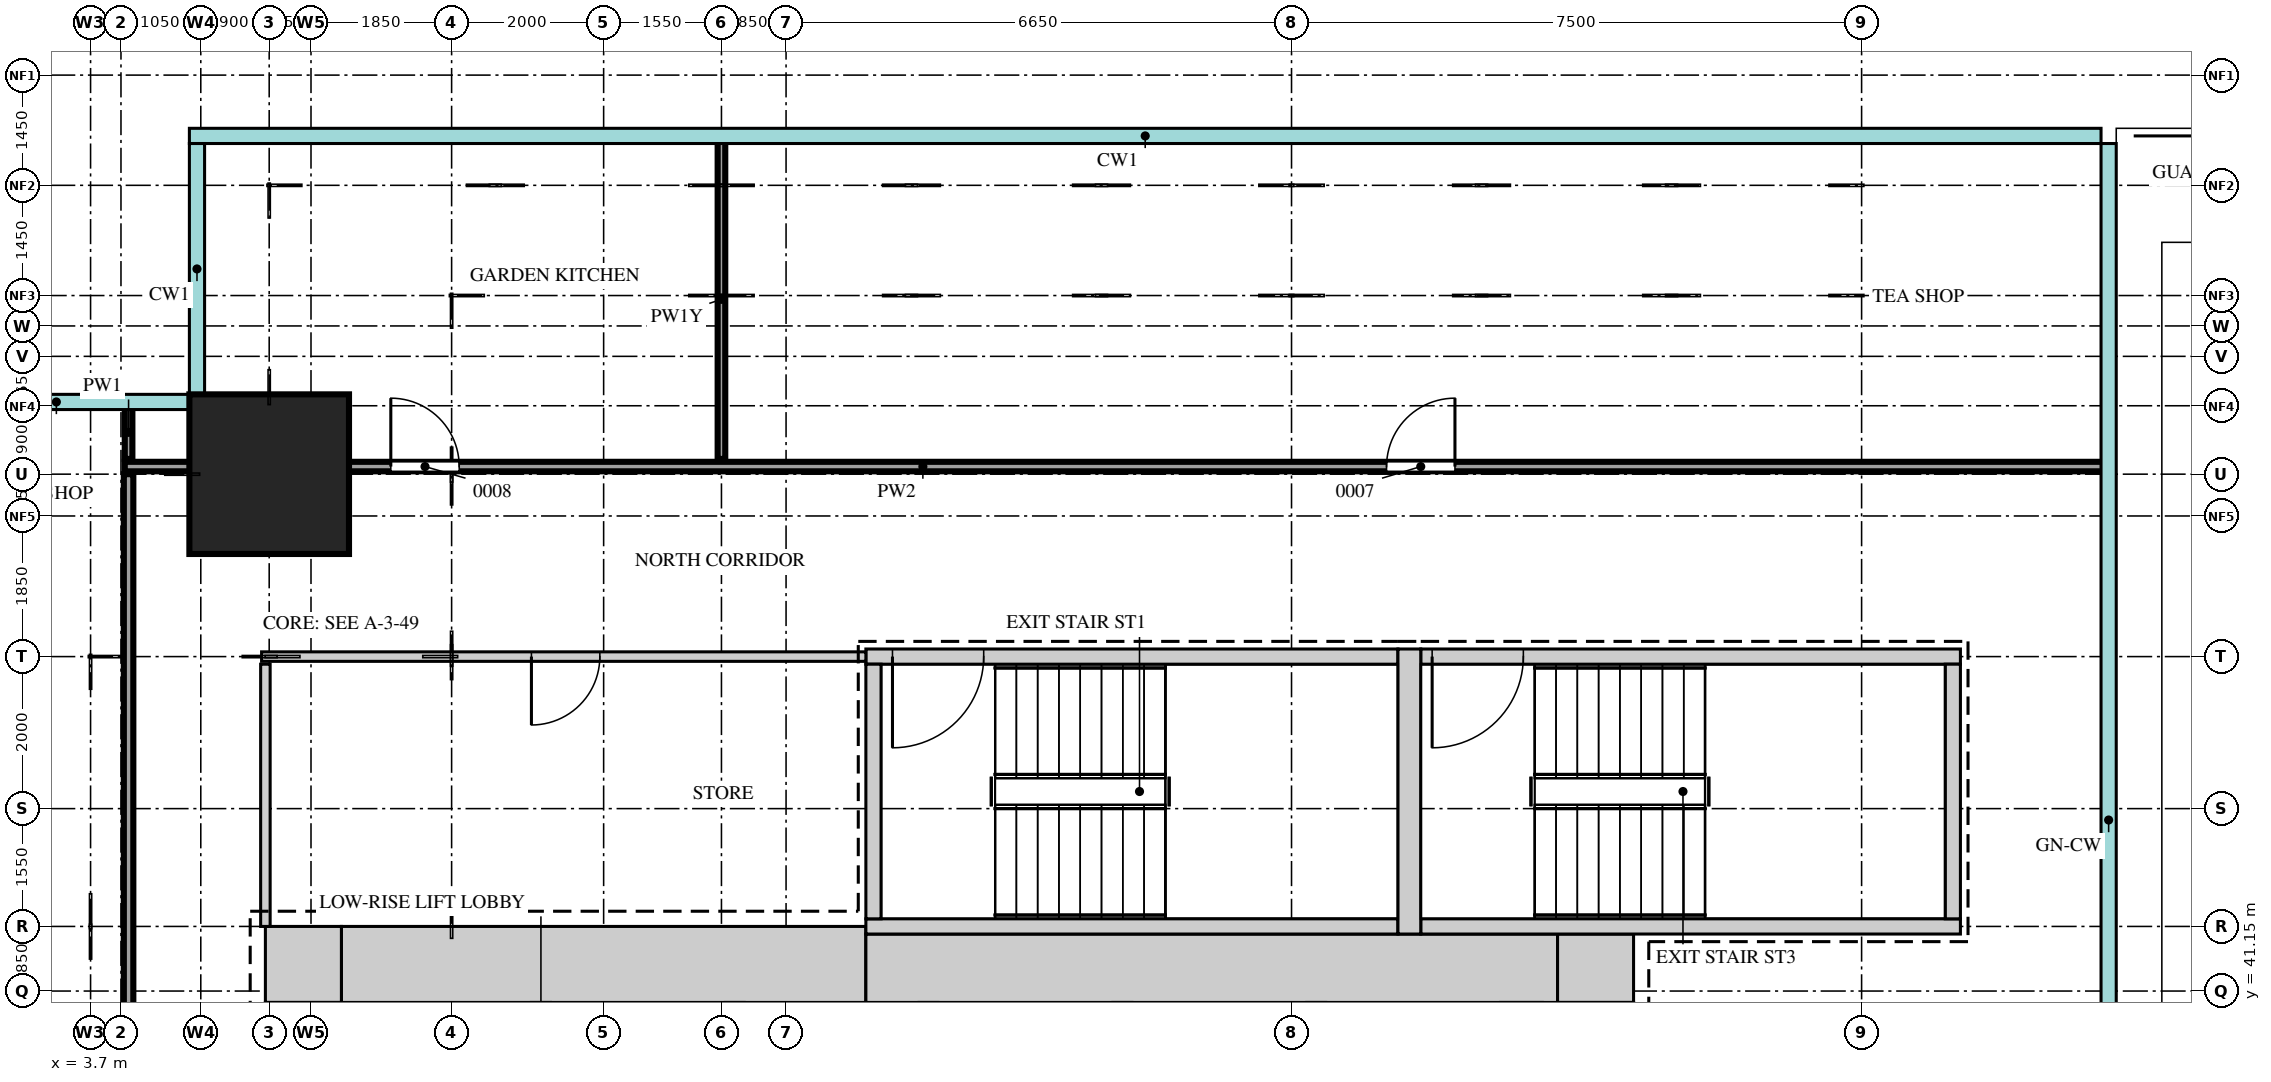
"""IFC4 building model, lengths in metres.
Left out: names, types, materials, properties, quantities, classifications, styles, units other than length and angle.
Written with IfcOpenShell. Run it as: python <this file> out.ifc"""

import sys

from ifc_helpers import new_model, si_unit, direction, frame, frame_2d, origin, origin_2d, place, context, subcontext, project, spatial, rectangle, extrude, source, transform, mapped, element, fill, save


model = new_model("IFC4")
c1 = context("Model", 3, precision=1e-05, world=origin(), true_north=direction((0.0, 1.0)))
c2 = subcontext(c1, "Body", "Model", "MODEL_VIEW")
j1 = project(units=[si_unit("LENGTHUNIT", "METRE"), si_unit("PLANEANGLEUNIT", "RADIAN")], contexts=[c1])
p1 = place(None, origin())
s1 = spatial("IfcSite", under=j1, at=p1, CompositionType="ELEMENT")
p2 = place(p1, origin())
s2 = spatial("IfcBuilding", under=s1, at=p2, CompositionType="ELEMENT")
p3 = place(p2, frame((0.0, 0.0, 158.7)))
s3 = spatial("IfcBuildingStorey", under=s2, at=p3, CompositionType="ELEMENT", Elevation=158.7)
m1 = source(origin(), c2, "Body", "SweptSolid", [
    extrude(rectangle(XDim=6.9, YDim=1.0, at=frame_2d((3.45, 0.0))), origin(), (0.0, 0.0, 1.0), 5.75),
])
p4 = place(p3, frame((7.0, 41.5, 0.0), z_axis=(0.0, 0.0, 1.0), x_axis=(1.0, 0.0, 0.0)))
e1 = element("IfcWall", 1, at=p4, inside=s3, PredefinedType="SHEAR", context=c2, shape_type="MappedRepresentation", body=[
    mapped(m1, transform((0.0, 0.0, 0.0))),
])
m2 = source(origin(), c2, "Body", "SweptSolid", [
    extrude(rectangle(XDim=9.1, YDim=0.9, at=frame_2d((4.55, 0.0))), origin(), (0.0, 0.0, 1.0), 5.75),
])
p5 = place(p3, frame((13.9, 41.45, 0.0), z_axis=(0.0, 0.0, 1.0), x_axis=(1.0, 0.0, 0.0)))
e2 = element("IfcWall", 2, at=p5, inside=s3, PredefinedType="SHEAR", context=c2, shape_type="MappedRepresentation", body=[
    mapped(m2, transform((0.0, 0.0, 0.0))),
])
m3 = source(origin(), c2, "Body", "SweptSolid", [
    extrude(rectangle(XDim=1.0, YDim=0.9, at=frame_2d((0.5, 0.0))), origin(), (0.0, 0.0, 1.0), 5.75),
])
p6 = place(p3, frame((23.0, 41.45, 0.0), z_axis=(0.0, 0.0, 1.0), x_axis=(1.0, 0.0, 0.0)))
e3 = element("IfcWall", 3, at=p6, inside=s3, PredefinedType="SHEAR", context=c2, shape_type="MappedRepresentation", body=[
    mapped(m3, transform((0.0, 0.0, 0.0))),
])
m4 = source(origin(), c2, "Body", "SweptSolid", [
    extrude(rectangle(XDim=1.0, YDim=1.0, at=frame_2d((0.5, 0.0))), origin(), (0.0, 0.0, 1.0), 5.75),
])
p7 = place(p3, frame((6.0, 41.5, 0.0), z_axis=(0.0, 0.0, 1.0), x_axis=(1.0, 0.0, 0.0)))
e4 = element("IfcWall", 4, at=p7, inside=s3, PredefinedType="SHEAR", context=c2, shape_type="MappedRepresentation", body=[
    mapped(m4, transform((0.0, 0.0, 0.0))),
])
m5 = source(origin(), c2, "Body", "SweptSolid", [
    extrude(rectangle(XDim=7.0, YDim=0.2, at=frame_2d((3.5, 0.0))), origin(), (0.0, 0.0, 1.0), 5.75),
])
p8 = place(p3, frame((13.9, 45.55, 0.0), z_axis=(0.0, 0.0, 1.0), x_axis=(1.0, 0.0, 0.0)))
e5 = element("IfcWall", 5, at=p8, inside=s3, PredefinedType="SHEAR", context=c2, shape_type="MappedRepresentation", body=[
    mapped(m5, transform((0.0, 0.0, 0.0))),
])
m6 = source(origin(), c2, "Body", "SweptSolid", [
    extrude(rectangle(XDim=1.2, YDim=2.1, at=frame_2d((0.6, 1.05))), frame((0.0, 0.11, 0.0), z_axis=(0.0, -1.0, 0.0), x_axis=(1.0, 0.0, 0.0)), (0.0, 0.0, 1.0), 0.22),
])
p9 = place(p8, frame((0.35, 0.0, 0.0)))
e6 = element("IfcOpeningElement", 6, at=p9, cuts=e5, PredefinedType="OPENING", context=c2, shape_type="MappedRepresentation", body=[
    mapped(m6, transform((0.0, 0.0, 0.0))),
])
p10 = place(p3, frame((13.9, 42.0, 0.0), z_axis=(0.0, 0.0, 1.0), x_axis=(1.0, 0.0, 0.0)))
e7 = element("IfcWall", 7, at=p10, inside=s3, PredefinedType="SHEAR", context=c2, shape_type="MappedRepresentation", body=[
    mapped(m5, transform((0.0, 0.0, 0.0))),
])
m7 = source(origin(), c2, "Body", "SweptSolid", [
    extrude(rectangle(XDim=7.1, YDim=0.2, at=frame_2d((3.55, 0.0))), origin(), (0.0, 0.0, 1.0), 5.75),
])
p11 = place(p3, frame((21.2, 45.55, 0.0), z_axis=(0.0, 0.0, 1.0), x_axis=(1.0, 0.0, 0.0)))
e8 = element("IfcWall", 8, at=p11, inside=s3, PredefinedType="SHEAR", context=c2, shape_type="MappedRepresentation", body=[
    mapped(m7, transform((0.0, 0.0, 0.0))),
])
p12 = place(p11, frame((0.15, 0.0, 0.0)))
e9 = element("IfcOpeningElement", 9, at=p12, cuts=e8, PredefinedType="OPENING", context=c2, shape_type="MappedRepresentation", body=[
    mapped(m6, transform((0.0, 0.0, 0.0))),
])
p13 = place(p3, frame((21.2, 42.0, 0.0), z_axis=(0.0, 0.0, 1.0), x_axis=(1.0, 0.0, 0.0)))
e10 = element("IfcWall", 10, at=p13, inside=s3, PredefinedType="SHEAR", context=c2, shape_type="MappedRepresentation", body=[
    mapped(m7, transform((0.0, 0.0, 0.0))),
])
m8 = source(origin(), c2, "Body", "SweptSolid", [
    extrude(rectangle(XDim=3.75, YDim=0.3, at=frame_2d((1.875, 0.0))), origin(), (0.0, 0.0, 1.0), 5.75),
])
p14 = place(p3, frame((21.05, 41.9, 0.0), z_axis=(0.0, 0.0, 1.0), x_axis=(0.0, 1.0, 0.0)))
e11 = element("IfcWall", 11, at=p14, inside=s3, PredefinedType="SHEAR", context=c2, shape_type="MappedRepresentation", body=[
    mapped(m8, transform((0.0, 0.0, 0.0))),
])
m9 = source(origin(), c2, "Body", "SweptSolid", [
    extrude(rectangle(XDim=3.35, YDim=0.2, at=frame_2d((1.675, 0.0))), origin(), (0.0, 0.0, 1.0), 5.75),
])
for number, where, z_axis, x_axis in (
    (12, (14.0, 42.1, 0.0), (0.0, 0.0, 1.0), (0.0, 1.0, 0.0)),
    (13, (28.2, 42.1, 0.0), (0.0, 0.0, 1.0), (0.0, 1.0, 0.0)),
):
    element("IfcWall", number, at=place(p3, frame(where, z_axis=z_axis, x_axis=x_axis)), inside=s3, PredefinedType="SHEAR", context=c2, shape_type="MappedRepresentation", body=[
        mapped(m9, transform((0.0, 0.0, 0.0))),
    ])
m10 = source(origin(), c2, "Body", "SweptSolid", [
    extrude(rectangle(XDim=2.1, YDim=2.1, at=origin_2d()), origin(), (0.0, 0.0, 1.0), 6.0),
])
p15 = place(p3, frame((6.05, 47.95, 0.0), z_axis=(0.0, 0.0, 1.0), x_axis=(1.0, 0.0, 0.0)))
e14 = element("IfcColumn", 14, at=p15, inside=s3, PredefinedType="COLUMN", context=c2, shape_type="MappedRepresentation", body=[
    mapped(m10, transform((0.0, 0.0, 0.0))),
])
m11 = source(origin(), c2, "Body", "SweptSolid", [
    extrude(rectangle(XDim=41.8, YDim=0.125, at=frame_2d((20.9, 0.0))), origin(), (0.0, 0.0, 1.0), 5.75),
])
p16 = place(p3, frame((4.2, 6.15, 0.0), z_axis=(0.0, 0.0, 1.0), x_axis=(0.0, 1.0, 0.0)))
e15 = element("IfcWall", 15, at=p16, inside=s3, PredefinedType="PARTITIONING", context=c2, shape_type="MappedRepresentation", body=[
    mapped(m11, transform((0.0, 0.0, 0.0))),
])
m12 = source(origin(), c2, "Body", "SweptSolid", [
    extrude(rectangle(XDim=0.9, YDim=2.1, at=frame_2d((0.45, 1.05))), frame((0.0, 0.073, 0.0), z_axis=(0.0, -1.0, 0.0), x_axis=(1.0, 0.0, 0.0)), (0.0, 0.0, 1.0), 0.145),
])
p17 = place(p16, frame((10.95, 0.0, 0.0)))
e16 = element("IfcOpeningElement", 16, at=p17, cuts=e15, PredefinedType="OPENING", context=c2, shape_type="MappedRepresentation", body=[
    mapped(m12, transform((0.0, 0.0, 0.0))),
])
p18 = place(p16, frame((29.55, 0.0, 0.0)))
e17 = element("IfcOpeningElement", 17, at=p18, cuts=e15, PredefinedType="OPENING", context=c2, shape_type="MappedRepresentation", body=[
    mapped(m12, transform((0.0, 0.0, 0.0))),
])
m13 = source(origin(), c2, "Body", "SweptSolid", [
    extrude(rectangle(XDim=3.45, YDim=0.125, at=frame_2d((1.725, 0.0))), origin(), (0.0, 0.0, 1.0), 5.75),
])
p19 = place(p3, frame((6.0, 42.0, 0.0), z_axis=(0.0, 0.0, 1.0), x_axis=(0.0, 1.0, 0.0)))
e18 = element("IfcWall", 18, at=p19, inside=s3, PredefinedType="PARTITIONING", context=c2, shape_type="MappedRepresentation", body=[
    mapped(m13, transform((0.0, 0.0, 0.0))),
])
m14 = source(origin(), c2, "Body", "SweptSolid", [
    extrude(rectangle(XDim=7.95, YDim=0.125, at=frame_2d((3.975, 0.0))), origin(), (0.0, 0.0, 1.0), 5.75),
])
p20 = place(p3, frame((5.95, 45.55, 0.0), z_axis=(0.0, 0.0, 1.0), x_axis=(1.0, 0.0, 0.0)))
e19 = element("IfcWall", 19, at=p20, inside=s3, PredefinedType="PARTITIONING", context=c2, shape_type="MappedRepresentation", body=[
    mapped(m14, transform((0.0, 0.0, 0.0))),
])
p21 = place(p20, frame((3.55, 0.0, 0.0)))
e20 = element("IfcOpeningElement", 20, at=p21, cuts=e19, PredefinedType="OPENING", context=c2, shape_type="MappedRepresentation", body=[
    mapped(m12, transform((0.0, 0.0, 0.0))),
])
m15 = source(origin(), c2, "Body", "SweptSolid", [
    extrude(rectangle(XDim=26.05, YDim=0.125, at=frame_2d((13.025, 0.0))), origin(), (0.0, 0.0, 1.0), 5.75),
])
p22 = place(p3, frame((4.15, 48.05, 0.0), z_axis=(0.0, 0.0, 1.0), x_axis=(1.0, 0.0, 0.0)))
e21 = element("IfcWall", 21, at=p22, inside=s3, PredefinedType="PARTITIONING", context=c2, shape_type="MappedRepresentation", body=[
    mapped(m15, transform((0.0, 0.0, 0.0))),
])
p23 = place(p22, frame((3.5, 0.0, 0.0)))
e22 = element("IfcOpeningElement", 22, at=p23, cuts=e21, PredefinedType="OPENING", context=c2, shape_type="MappedRepresentation", body=[
    mapped(m12, transform((0.0, 0.0, 0.0))),
])
p24 = place(p22, frame((16.6, 0.0, 0.0)))
e23 = element("IfcOpeningElement", 23, at=p24, cuts=e21, PredefinedType="OPENING", context=c2, shape_type="MappedRepresentation", body=[
    mapped(m12, transform((0.0, 0.0, 0.0))),
])
m16 = source(origin(), c2, "Body", "SweptSolid", [
    extrude(rectangle(XDim=0.7, YDim=0.1, at=frame_2d((0.35, 0.0))), origin(), (0.0, 0.0, 1.0), 5.75),
])
p25 = place(p3, frame((4.2, 48.15, 0.0), z_axis=(0.0, 0.0, 1.0), x_axis=(0.0, 1.0, 0.0)))
e24 = element("IfcWall", 24, at=p25, inside=s3, PredefinedType="PARTITIONING", context=c2, shape_type="MappedRepresentation", body=[
    mapped(m16, transform((0.0, 0.0, 0.0))),
])
m17 = source(origin(), c2, "Body", "SweptSolid", [
    extrude(rectangle(XDim=4.2, YDim=0.1, at=frame_2d((2.1, 0.0))), origin(), (0.0, 0.0, 1.0), 2.85),
])
p26 = place(p3, frame((12.0, 48.15, 0.0), z_axis=(0.0, 0.0, 1.0), x_axis=(0.0, 1.0, 0.0)))
e25 = element("IfcWall", 25, at=p26, inside=s3, PredefinedType="PARTITIONING", context=c2, shape_type="MappedRepresentation", body=[
    mapped(m17, transform((0.0, 0.0, 0.0))),
])
m18 = source(origin(), c2, "Body", "SweptSolid", [
    extrude(rectangle(XDim=0.9, YDim=2.1, at=frame_2d((0.45, 1.05))), frame((0.0, 0.025, 0.0), z_axis=(0.0, -1.0, 0.0), x_axis=(1.0, 0.0, 0.0)), (0.0, 0.0, 1.0), 0.05),
])
p27 = place(p23, origin())
e26 = element("IfcDoor", 26, at=p27, inside=s3, OperationType="SINGLE_SWING_RIGHT", PredefinedType="DOOR", context=c2, shape_type="MappedRepresentation", body=[
    mapped(m18, transform((0.0, 0.0, 0.0))),
])
fill(e22, e26)
p28 = place(p24, origin())
e27 = element("IfcDoor", 27, at=p28, inside=s3, OperationType="SINGLE_SWING_LEFT", PredefinedType="DOOR", context=c2, shape_type="MappedRepresentation", body=[
    mapped(m18, transform((0.0, 0.0, 0.0))),
])
fill(e23, e27)
p29 = place(p21, origin())
e28 = element("IfcDoor", 28, at=p29, inside=s3, OperationType="SINGLE_SWING_LEFT", PredefinedType="DOOR", context=c2, shape_type="MappedRepresentation", body=[
    mapped(m18, transform((0.0, 0.0, 0.0))),
])
fill(e20, e28)
m19 = source(origin(), c2, "Body", "SweptSolid", [
    extrude(rectangle(XDim=1.2, YDim=2.1, at=frame_2d((0.6, 1.05))), frame((0.0, 0.025, 0.0), z_axis=(0.0, -1.0, 0.0), x_axis=(1.0, 0.0, 0.0)), (0.0, 0.0, 1.0), 0.05),
])
p30 = place(p9, origin())
e29 = element("IfcDoor", 29, at=p30, inside=s3, OperationType="SINGLE_SWING_LEFT", PredefinedType="DOOR", context=c2, shape_type="MappedRepresentation", body=[
    mapped(m19, transform((0.0, 0.0, 0.0))),
])
fill(e6, e29)
p31 = place(p12, origin())
e30 = element("IfcDoor", 30, at=p31, inside=s3, OperationType="SINGLE_SWING_LEFT", PredefinedType="DOOR", context=c2, shape_type="MappedRepresentation", body=[
    mapped(m19, transform((0.0, 0.0, 0.0))),
])
fill(e9, e30)
save(model, sys.argv[1])
